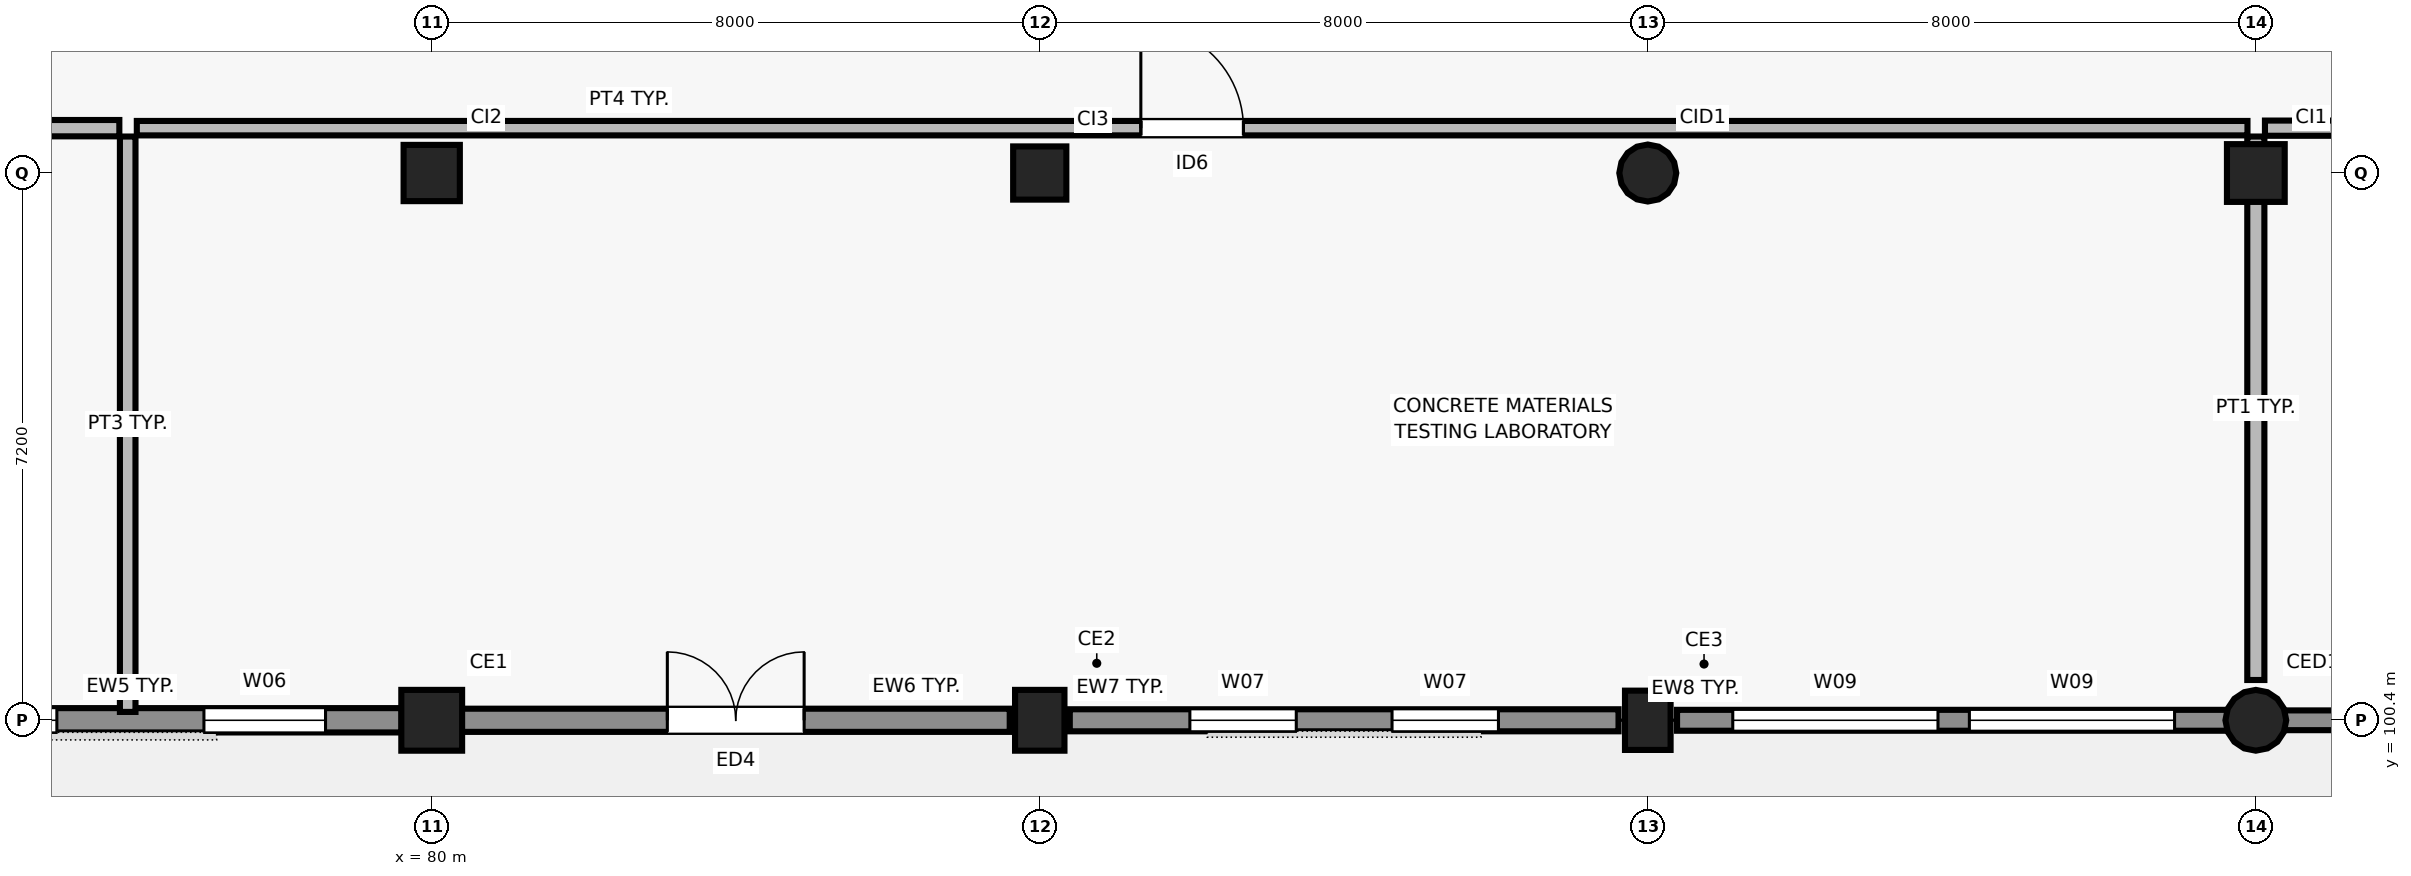
"""IFC4 building model, lengths in metres.
Left out: names, types, materials, properties, quantities, classifications, styles, units other than length and angle.
Written with IfcOpenShell. Run it as: python <this file> out.ifc"""

import sys

from ifc_helpers import new_model, si_unit, direction, frame, frame_2d, origin, origin_2d, place, context, subcontext, project, spatial, rectangle, circle, extrude, element, fill, save


model = new_model("IFC4")
c1 = context("Model", 3, precision=1e-05, world=origin(), true_north=direction((0.0, 1.0)))
c2 = subcontext(c1, "Body", "Model", "MODEL_VIEW")
j1 = project(units=[si_unit("LENGTHUNIT", "METRE"), si_unit("PLANEANGLEUNIT", "RADIAN")], contexts=[c1])
p1 = place(None, origin())
s1 = spatial("IfcSite", under=j1, at=p1, CompositionType="ELEMENT")
p2 = place(p1, origin())
s2 = spatial("IfcBuilding", under=s1, at=p2, CompositionType="ELEMENT")
p3 = place(p2, origin())
s3 = spatial("IfcBuildingStorey", under=s2, at=p3, CompositionType="ELEMENT", Elevation=0.0)
p4 = place(p3, frame((80.0, 100.4, 0.0), z_axis=(0.0, 0.0, 1.0), x_axis=(1.0, 0.0, 0.0)))
e1 = element("IfcColumn", 1, at=p4, inside=s3, PredefinedType="COLUMN", context=c2, shape_type="SweptSolid", body=[
    extrude(rectangle(XDim=0.8, YDim=0.8, at=origin_2d()), origin(), (0.0, 0.0, 1.0), 4.5),
])
p5 = place(p3, frame((80.0, 107.6, 0.0), z_axis=(0.0, 0.0, 1.0), x_axis=(1.0, 0.0, 0.0)))
e2 = element("IfcColumn", 2, at=p5, inside=s3, PredefinedType="COLUMN", context=c2, shape_type="SweptSolid", body=[
    extrude(rectangle(XDim=0.74, YDim=0.74, at=origin_2d()), origin(), (0.0, 0.0, 1.0), 4.5),
])
p6 = place(p3, frame((88.0, 100.4, 0.0), z_axis=(0.0, 0.0, 1.0), x_axis=(1.0, 0.0, 0.0)))
e3 = element("IfcColumn", 3, at=p6, inside=s3, PredefinedType="COLUMN", context=c2, shape_type="SweptSolid", body=[
    extrude(rectangle(XDim=0.8, YDim=0.65, at=origin_2d()), origin(), (0.0, 0.0, 1.0), 4.5),
])
p7 = place(p3, frame((88.0, 107.6, 0.0), z_axis=(0.0, 0.0, 1.0), x_axis=(1.0, 0.0, 0.0)))
e4 = element("IfcColumn", 4, at=p7, inside=s3, PredefinedType="COLUMN", context=c2, shape_type="SweptSolid", body=[
    extrude(rectangle(XDim=0.7, YDim=0.7, at=origin_2d()), origin(), (0.0, 0.0, 1.0), 4.5),
])
p8 = place(p3, frame((96.0, 100.4, 0.0), z_axis=(0.0, 0.0, 1.0), x_axis=(1.0, 0.0, 0.0)))
e5 = element("IfcColumn", 5, at=p8, inside=s3, PredefinedType="COLUMN", context=c2, shape_type="SweptSolid", body=[
    extrude(rectangle(XDim=0.78, YDim=0.6, at=origin_2d()), origin(), (0.0, 0.0, 1.0), 4.5),
])
p9 = place(p3, frame((96.0, 107.6, 0.0), z_axis=(0.0, 0.0, 1.0), x_axis=(1.0, 0.0, 0.0)))
e6 = element("IfcColumn", 6, at=p9, inside=s3, PredefinedType="COLUMN", context=c2, shape_type="SweptSolid", body=[
    extrude(circle(Radius=0.375, at=origin_2d()), origin(), (0.0, 0.0, 1.0), 4.5),
])
p10 = place(p3, frame((104.0, 100.4, 0.0), z_axis=(0.0, 0.0, 1.0), x_axis=(1.0, 0.0, 0.0)))
e7 = element("IfcColumn", 7, at=p10, inside=s3, PredefinedType="COLUMN", context=c2, shape_type="SweptSolid", body=[
    extrude(circle(Radius=0.4, at=origin_2d()), origin(), (0.0, 0.0, 1.0), 4.5),
])
p11 = place(p3, frame((104.0, 107.6, 0.0), z_axis=(0.0, 0.0, 1.0), x_axis=(1.0, 0.0, 0.0)))
e8 = element("IfcColumn", 8, at=p11, inside=s3, PredefinedType="COLUMN", context=c2, shape_type="SweptSolid", body=[
    extrude(rectangle(XDim=0.76, YDim=0.76, at=origin_2d()), origin(), (0.0, 0.0, 1.0), 4.5),
])
p12 = place(p3, frame((72.336, 100.4, 0.0), z_axis=(0.0, 0.0, 1.0), x_axis=(1.0, 0.0, 0.0)))
e9 = element("IfcWall", 9, at=p12, inside=s3, PredefinedType="SOLIDWALL", context=c2, shape_type="SweptSolid", body=[
    extrude(rectangle(XDim=7.269, YDim=0.32, at=frame_2d((3.635, 0.0))), origin(), (0.0, 0.0, 1.0), 3.72),
])
p13 = place(p12, frame((0.932, 0.0, 0.9)))
e10 = element("IfcOpeningElement", 10, at=p13, cuts=e9, PredefinedType="OPENING", context=c2, shape_type="SweptSolid", body=[
    extrude(rectangle(XDim=1.8, YDim=1.8, at=frame_2d((0.9, 0.9))), frame((0.0, 0.17, 0.0), z_axis=(0.0, -1.0, 0.0), x_axis=(1.0, 0.0, 0.0)), (0.0, 0.0, 1.0), 0.34),
])
p14 = place(p12, frame((4.667, 0.0, 0.9)))
e11 = element("IfcOpeningElement", 11, at=p14, cuts=e9, PredefinedType="OPENING", context=c2, shape_type="SweptSolid", body=[
    extrude(rectangle(XDim=1.6, YDim=1.8, at=frame_2d((0.8, 0.9))), frame((0.0, 0.17, 0.0), z_axis=(0.0, -1.0, 0.0), x_axis=(1.0, 0.0, 0.0)), (0.0, 0.0, 1.0), 0.34),
])
p15 = place(p3, frame((80.395, 100.4, 0.0), z_axis=(0.0, 0.0, 1.0), x_axis=(1.0, 0.0, 0.0)))
e12 = element("IfcWall", 12, at=p15, inside=s3, PredefinedType="SOLIDWALL", context=c2, shape_type="SweptSolid", body=[
    extrude(rectangle(XDim=7.21, YDim=0.305, at=frame_2d((3.605, 0.0))), origin(), (0.0, 0.0, 1.0), 3.54),
])
p16 = place(p15, frame((2.705, 0.0, 0.0)))
e13 = element("IfcOpeningElement", 13, at=p16, cuts=e12, PredefinedType="OPENING", context=c2, shape_type="SweptSolid", body=[
    extrude(rectangle(XDim=1.8, YDim=2.3, at=frame_2d((0.9, 1.15))), frame((0.0, 0.162, 0.0), z_axis=(0.0, -1.0, 0.0), x_axis=(1.0, 0.0, 0.0)), (0.0, 0.0, 1.0), 0.325),
])
p17 = place(p3, frame((88.395, 100.4, 0.0), z_axis=(0.0, 0.0, 1.0), x_axis=(1.0, 0.0, 0.0)))
e14 = element("IfcWall", 14, at=p17, inside=s3, PredefinedType="SOLIDWALL", context=c2, shape_type="SweptSolid", body=[
    extrude(rectangle(XDim=7.22, YDim=0.29, at=frame_2d((3.61, 0.0))), origin(), (0.0, 0.0, 1.0), 3.57),
])
p18 = place(p17, frame((1.58, 0.0, 0.9)))
e15 = element("IfcOpeningElement", 15, at=p18, cuts=e14, PredefinedType="OPENING", context=c2, shape_type="SweptSolid", body=[
    extrude(rectangle(XDim=1.4, YDim=1.8, at=frame_2d((0.7, 0.9))), frame((0.0, 0.155, 0.0), z_axis=(0.0, -1.0, 0.0), x_axis=(1.0, 0.0, 0.0)), (0.0, 0.0, 1.0), 0.31),
])
p19 = place(p17, frame((4.24, 0.0, 0.9)))
e16 = element("IfcOpeningElement", 16, at=p19, cuts=e14, PredefinedType="OPENING", context=c2, shape_type="SweptSolid", body=[
    extrude(rectangle(XDim=1.4, YDim=1.8, at=frame_2d((0.7, 0.9))), frame((0.0, 0.155, 0.0), z_axis=(0.0, -1.0, 0.0), x_axis=(1.0, 0.0, 0.0)), (0.0, 0.0, 1.0), 0.31),
])
p20 = place(p3, frame((96.385, 100.4, 0.0), z_axis=(0.0, 0.0, 1.0), x_axis=(1.0, 0.0, 0.0)))
e17 = element("IfcWall", 17, at=p20, inside=s3, PredefinedType="SOLIDWALL", context=c2, shape_type="SweptSolid", body=[
    extrude(rectangle(XDim=7.279, YDim=0.275, at=frame_2d((3.64, 0.0))), origin(), (0.0, 0.0, 1.0), 3.54),
])
p21 = place(p20, frame((0.733, 0.0, 0.9)))
e18 = element("IfcOpeningElement", 18, at=p21, cuts=e17, PredefinedType="OPENING", context=c2, shape_type="SweptSolid", body=[
    extrude(rectangle(XDim=2.7, YDim=1.5, at=frame_2d((1.35, 0.75))), frame((0.0, 0.147, 0.0), z_axis=(0.0, -1.0, 0.0), x_axis=(1.0, 0.0, 0.0)), (0.0, 0.0, 1.0), 0.295),
])
p22 = place(p20, frame((3.846, 0.0, 0.9)))
e19 = element("IfcOpeningElement", 19, at=p22, cuts=e17, PredefinedType="OPENING", context=c2, shape_type="SweptSolid", body=[
    extrude(rectangle(XDim=2.7, YDim=1.5, at=frame_2d((1.35, 0.75))), frame((0.0, 0.147, 0.0), z_axis=(0.0, -1.0, 0.0), x_axis=(1.0, 0.0, 0.0)), (0.0, 0.0, 1.0), 0.295),
])
p23 = place(p3, frame((104.336, 100.4, 0.0), z_axis=(0.0, 0.0, 1.0), x_axis=(1.0, 0.0, 0.0)))
e20 = element("IfcWall", 20, at=p23, inside=s3, PredefinedType="SOLIDWALL", context=c2, shape_type="SweptSolid", body=[
    extrude(rectangle(XDim=7.269, YDim=0.26, at=frame_2d((3.635, 0.0))), origin(), (0.0, 0.0, 1.0), 3.67),
])
p24 = place(p23, frame((1.063, 0.0, 0.9)))
e21 = element("IfcOpeningElement", 21, at=p24, cuts=e20, PredefinedType="OPENING", context=c2, shape_type="SweptSolid", body=[
    extrude(rectangle(XDim=2.2, YDim=1.5, at=frame_2d((1.1, 0.75))), frame((0.0, 0.14, 0.0), z_axis=(0.0, -1.0, 0.0), x_axis=(1.0, 0.0, 0.0)), (0.0, 0.0, 1.0), 0.28),
])
p25 = place(p23, frame((4.006, 0.0, 0.9)))
e22 = element("IfcOpeningElement", 22, at=p25, cuts=e20, PredefinedType="OPENING", context=c2, shape_type="SweptSolid", body=[
    extrude(rectangle(XDim=2.2, YDim=1.5, at=frame_2d((1.1, 0.75))), frame((0.0, 0.14, 0.0), z_axis=(0.0, -1.0, 0.0), x_axis=(1.0, 0.0, 0.0)), (0.0, 0.0, 1.0), 0.28),
])
p26 = place(p3, frame((48.119, 108.19, 0.0), z_axis=(0.0, 0.0, 1.0), x_axis=(1.0, 0.0, 0.0)))
e23 = element("IfcWall", 23, at=p26, inside=s3, PredefinedType="PARTITIONING", context=c2, shape_type="SweptSolid", body=[
    extrude(rectangle(XDim=27.771, YDim=0.215, at=frame_2d((13.885, 0.0))), origin(), (0.0, 0.0, 1.0), 4.2),
])
p27 = place(p26, frame((13.245, 0.0, 0.0)))
e24 = element("IfcOpeningElement", 24, at=p27, cuts=e23, PredefinedType="OPENING", context=c2, shape_type="SweptSolid", body=[
    extrude(rectangle(XDim=1.28, YDim=2.2, at=frame_2d((0.64, 1.1))), frame((0.0, 0.117, 0.0), z_axis=(0.0, -1.0, 0.0), x_axis=(1.0, 0.0, 0.0)), (0.0, 0.0, 1.0), 0.235),
])
p28 = place(p3, frame((76.0, 100.51, 0.0), z_axis=(0.0, 0.0, 1.0), x_axis=(0.0, 1.0, 0.0)))
e25 = element("IfcWall", 25, at=p28, inside=s3, PredefinedType="PARTITIONING", context=c2, shape_type="SweptSolid", body=[
    extrude(rectangle(XDim=7.57, YDim=0.205, at=frame_2d((3.785, 0.0))), origin(), (0.0, 0.0, 1.0), 4.2),
])
p29 = place(p3, frame((76.12, 108.19, 0.0), z_axis=(0.0, 0.0, 1.0), x_axis=(1.0, 0.0, 0.0)))
e26 = element("IfcWall", 26, at=p29, inside=s3, PredefinedType="PARTITIONING", context=c2, shape_type="SweptSolid", body=[
    extrude(rectangle(XDim=27.77, YDim=0.19, at=frame_2d((13.885, 0.0))), origin(), (0.0, 0.0, 1.0), 4.2),
])
p30 = place(p29, frame((13.21, 0.0, 0.0)))
e27 = element("IfcOpeningElement", 27, at=p30, cuts=e26, PredefinedType="OPENING", context=c2, shape_type="SweptSolid", body=[
    extrude(rectangle(XDim=1.35, YDim=2.2, at=frame_2d((0.675, 1.1))), frame((0.0, 0.105, 0.0), z_axis=(0.0, -1.0, 0.0), x_axis=(1.0, 0.0, 0.0)), (0.0, 0.0, 1.0), 0.21),
])
p31 = place(p3, frame((104.0, 100.93, 0.0), z_axis=(0.0, 0.0, 1.0), x_axis=(0.0, 1.0, 0.0)))
e28 = element("IfcWall", 28, at=p31, inside=s3, PredefinedType="PARTITIONING", context=c2, shape_type="SweptSolid", body=[
    extrude(rectangle(XDim=7.15, YDim=0.225, at=frame_2d((3.575, 0.0))), origin(), (0.0, 0.0, 1.0), 3.64),
])
p32 = place(p3, frame((104.12, 108.19, 0.0), z_axis=(0.0, 0.0, 1.0), x_axis=(1.0, 0.0, 0.0)))
e29 = element("IfcWall", 29, at=p32, inside=s3, PredefinedType="SOLIDWALL", context=c2, shape_type="SweptSolid", body=[
    extrude(rectangle(XDim=15.88, YDim=0.2, at=frame_2d((7.94, 0.0))), origin(), (0.0, 0.0, 1.0), 4.2),
])
p33 = place(p32, frame((8.57, 0.0, 0.0)))
e30 = element("IfcOpeningElement", 30, at=p33, cuts=e29, PredefinedType="OPENING", context=c2, shape_type="SweptSolid", body=[
    extrude(rectangle(XDim=1.28, YDim=2.2, at=frame_2d((0.64, 1.1))), frame((0.0, 0.11, 0.0), z_axis=(0.0, -1.0, 0.0), x_axis=(1.0, 0.0, 0.0)), (0.0, 0.0, 1.0), 0.22),
])
p34 = place(p13, origin())
e31 = element("IfcWindow", 31, at=p34, inside=s3, PartitioningType="SINGLE_PANEL", PredefinedType="WINDOW", context=c2, shape_type="SweptSolid", body=[
    extrude(rectangle(XDim=1.8, YDim=1.8, at=frame_2d((0.9, 0.9))), frame((0.0, 0.03, 0.0), z_axis=(0.0, -1.0, 0.0), x_axis=(1.0, 0.0, 0.0)), (0.0, 0.0, 1.0), 0.06),
])
fill(e10, e31)
p35 = place(p14, origin())
e32 = element("IfcWindow", 32, at=p35, inside=s3, PartitioningType="SINGLE_PANEL", PredefinedType="WINDOW", context=c2, shape_type="SweptSolid", body=[
    extrude(rectangle(XDim=1.6, YDim=1.8, at=frame_2d((0.8, 0.9))), frame((0.0, 0.03, 0.0), z_axis=(0.0, -1.0, 0.0), x_axis=(1.0, 0.0, 0.0)), (0.0, 0.0, 1.0), 0.06),
])
fill(e11, e32)
p36 = place(p16, frame((1.8, 0.0, 0.0), z_axis=(0.0, 0.0, 1.0), x_axis=(-1.0, 0.0, 0.0)))
e33 = element("IfcDoor", 33, at=p36, inside=s3, OperationType="DOUBLE_DOOR_SINGLE_SWING", PredefinedType="DOOR", context=c2, shape_type="SweptSolid", body=[
    extrude(rectangle(XDim=1.8, YDim=2.3, at=frame_2d((0.9, 1.15))), frame((0.0, 0.025, 0.0), z_axis=(0.0, -1.0, 0.0), x_axis=(1.0, 0.0, 0.0)), (0.0, 0.0, 1.0), 0.05),
])
fill(e13, e33)
p37 = place(p18, origin())
e34 = element("IfcWindow", 34, at=p37, inside=s3, PartitioningType="SINGLE_PANEL", PredefinedType="WINDOW", context=c2, shape_type="SweptSolid", body=[
    extrude(rectangle(XDim=1.4, YDim=1.8, at=frame_2d((0.7, 0.9))), frame((0.0, 0.03, 0.0), z_axis=(0.0, -1.0, 0.0), x_axis=(1.0, 0.0, 0.0)), (0.0, 0.0, 1.0), 0.06),
])
fill(e15, e34)
p38 = place(p19, origin())
e35 = element("IfcWindow", 35, at=p38, inside=s3, PartitioningType="SINGLE_PANEL", PredefinedType="WINDOW", context=c2, shape_type="SweptSolid", body=[
    extrude(rectangle(XDim=1.4, YDim=1.8, at=frame_2d((0.7, 0.9))), frame((0.0, 0.03, 0.0), z_axis=(0.0, -1.0, 0.0), x_axis=(1.0, 0.0, 0.0)), (0.0, 0.0, 1.0), 0.06),
])
fill(e16, e35)
p39 = place(p21, origin())
e36 = element("IfcWindow", 36, at=p39, inside=s3, PartitioningType="SINGLE_PANEL", PredefinedType="WINDOW", context=c2, shape_type="SweptSolid", body=[
    extrude(rectangle(XDim=2.7, YDim=1.5, at=frame_2d((1.35, 0.75))), frame((0.0, 0.03, 0.0), z_axis=(0.0, -1.0, 0.0), x_axis=(1.0, 0.0, 0.0)), (0.0, 0.0, 1.0), 0.06),
])
fill(e18, e36)
p40 = place(p22, origin())
e37 = element("IfcWindow", 37, at=p40, inside=s3, PartitioningType="SINGLE_PANEL", PredefinedType="WINDOW", context=c2, shape_type="SweptSolid", body=[
    extrude(rectangle(XDim=2.7, YDim=1.5, at=frame_2d((1.35, 0.75))), frame((0.0, 0.03, 0.0), z_axis=(0.0, -1.0, 0.0), x_axis=(1.0, 0.0, 0.0)), (0.0, 0.0, 1.0), 0.06),
])
fill(e19, e37)
p41 = place(p30, origin())
e38 = element("IfcDoor", 38, at=p41, inside=s3, OperationType="SINGLE_SWING_LEFT", PredefinedType="DOOR", context=c2, shape_type="SweptSolid", body=[
    extrude(rectangle(XDim=1.35, YDim=2.2, at=frame_2d((0.675, 1.1))), frame((0.0, 0.025, 0.0), z_axis=(0.0, -1.0, 0.0), x_axis=(1.0, 0.0, 0.0)), (0.0, 0.0, 1.0), 0.05),
])
fill(e27, e38)
save(model, sys.argv[1])
